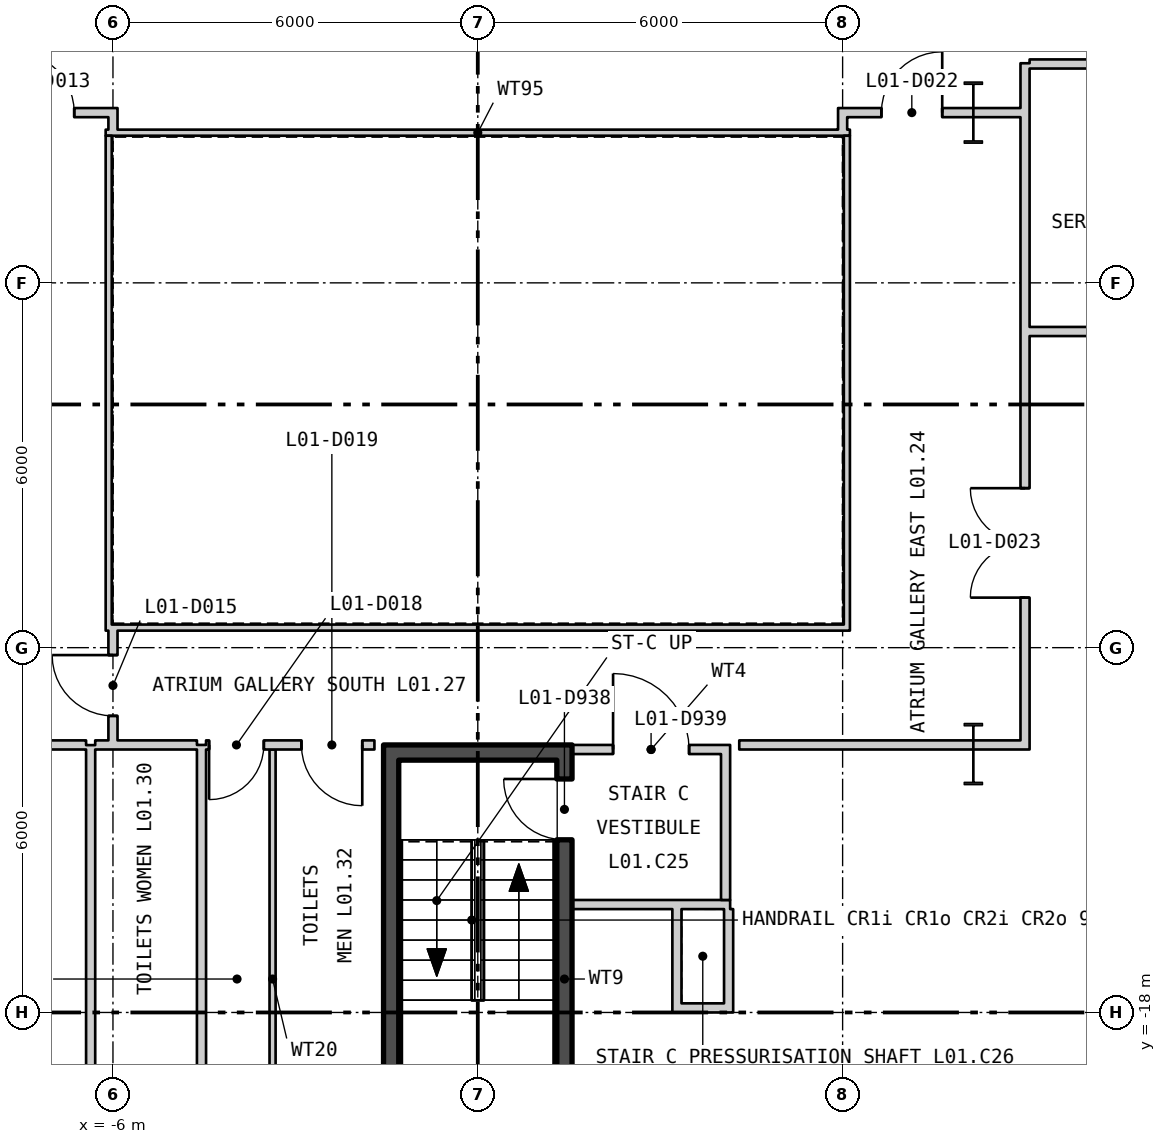
"""IFC4 building model, lengths in metres.
Left out: names, types, materials, properties, quantities, classifications, styles, units other than length and angle.
Written with IfcOpenShell. Run it as: python <this file> out.ifc"""

import sys

from ifc_helpers import new_model, si_unit, direction, frame, frame_2d, origin, origin_2d, place, context, subcontext, project, spatial, rectangle, i_section, extrude, element, fill, save


model = new_model("IFC4")
c1 = context("Model", 3, precision=1e-05, world=origin(), true_north=direction((0.0, 1.0)))
c2 = subcontext(c1, "Body", "Model", "MODEL_VIEW")
j1 = project(units=[si_unit("LENGTHUNIT", "METRE"), si_unit("PLANEANGLEUNIT", "RADIAN")], contexts=[c1])
p1 = place(None, origin())
s1 = spatial("IfcSite", under=j1, at=p1, CompositionType="ELEMENT")
p2 = place(p1, origin())
s2 = spatial("IfcBuilding", under=s1, at=p2, CompositionType="ELEMENT")
p3 = place(p2, frame((0.0, 0.0, 8.4)))
s3 = spatial("IfcBuildingStorey", under=s2, at=p3, CompositionType="ELEMENT", Elevation=8.4)
for number, where, z_axis, x_axis in (
    (1, (8.15, -3.2, 0.0), (0.0, 0.0, 1.0), (1.0, 0.0, 0.0)),
    (2, (8.15, -13.75, 0.0), (0.0, 0.0, 1.0), (1.0, 0.0, 0.0)),
):
    element("IfcColumn", number, at=place(p3, frame(where, z_axis=z_axis, x_axis=x_axis)), inside=s3, PredefinedType="COLUMN", context=c2, shape_type="SweptSolid", body=[
        extrude(i_section(OverallWidth=0.302, OverallDepth=1.008, WebThickness=0.021, FlangeThickness=0.04, at=origin_2d()), origin(), (0.0, 0.0, 1.0), 5.1),
    ])
p4 = place(p3, frame((-6.12, -11.67, 0.0), z_axis=(0.0, 0.0, 1.0), x_axis=(1.0, 0.0, 0.0)))
e3 = element("IfcWall", 3, at=p4, inside=s3, PredefinedType="PARTITIONING", context=c2, shape_type="SweptSolid", body=[
    extrude(rectangle(XDim=12.24, YDim=0.1, at=frame_2d((6.12, 0.0))), origin(), (0.0, 0.0, 1.0), 4.88),
])
p5 = place(p3, frame((6.07, -11.62, 0.0), z_axis=(0.0, 0.0, 1.0), x_axis=(0.0, 1.0, 0.0)))
e4 = element("IfcWall", 4, at=p5, inside=s3, PredefinedType="PARTITIONING", context=c2, shape_type="SweptSolid", body=[
    extrude(rectangle(XDim=8.04, YDim=0.1, at=frame_2d((4.02, 0.0))), origin(), (0.0, 0.0, 1.0), 4.88),
])
p6 = place(p3, frame((6.12, -3.53, 0.0), z_axis=(0.0, 0.0, 1.0), x_axis=(-1.0, 0.0, 0.0)))
e5 = element("IfcWall", 5, at=p6, inside=s3, PredefinedType="PARTITIONING", context=c2, shape_type="SweptSolid", body=[
    extrude(rectangle(XDim=12.24, YDim=0.1, at=frame_2d((6.12, 0.0))), origin(), (0.0, 0.0, 1.0), 4.88),
])
p7 = place(p3, frame((-6.07, -3.58, 0.0), z_axis=(0.0, 0.0, 1.0), x_axis=(0.0, -1.0, 0.0)))
e6 = element("IfcWall", 6, at=p7, inside=s3, PredefinedType="PARTITIONING", context=c2, shape_type="SweptSolid", body=[
    extrude(rectangle(XDim=8.04, YDim=0.1, at=frame_2d((4.02, 0.0))), origin(), (0.0, 0.0, 1.0), 4.88),
])
p8 = place(p3, frame((-1.425, -21.05, 0.0), z_axis=(0.0, 0.0, 1.0), x_axis=(0.0, 1.0, 0.0)))
e7 = element("IfcWall", 7, at=p8, inside=s3, PredefinedType="SHEAR", context=c2, shape_type="SweptSolid", body=[
    extrude(rectangle(XDim=7.2, YDim=0.25, at=frame_2d((3.6, 0.0))), origin(), (0.0, 0.0, 1.0), 4.88),
])
p9 = place(p3, frame((1.425, -21.05, 0.0), z_axis=(0.0, 0.0, 1.0), x_axis=(0.0, 1.0, 0.0)))
e8 = element("IfcWall", 8, at=p9, inside=s3, PredefinedType="SHEAR", context=c2, shape_type="SweptSolid", body=[
    extrude(rectangle(XDim=7.2, YDim=0.25, at=frame_2d((3.6, 0.0))), origin(), (0.0, 0.0, 1.0), 4.88),
])
p10 = place(p9, frame((5.89, 0.0, 0.0)))
e9 = element("IfcOpeningElement", 9, at=p10, cuts=e8, PredefinedType="OPENING", context=c2, shape_type="SweptSolid", body=[
    extrude(rectangle(XDim=1.0, YDim=2.1, at=frame_2d((0.5, 1.05))), frame((0.0, 0.135, 0.0), z_axis=(0.0, -1.0, 0.0), x_axis=(1.0, 0.0, 0.0)), (0.0, 0.0, 1.0), 0.27),
])
p11 = place(p3, frame((-1.55, -13.725, 0.0), z_axis=(0.0, 0.0, 1.0), x_axis=(1.0, 0.0, 0.0)))
e10 = element("IfcWall", 10, at=p11, inside=s3, PredefinedType="SHEAR", context=c2, shape_type="SweptSolid", body=[
    extrude(rectangle(XDim=3.1, YDim=0.25, at=frame_2d((1.55, 0.0))), origin(), (0.0, 0.0, 1.0), 4.88),
])
p12 = place(p3, frame((1.55, -16.225, 0.0), z_axis=(0.0, 0.0, 1.0), x_axis=(1.0, 0.0, 0.0)))
e11 = element("IfcWall", 11, at=p12, inside=s3, PredefinedType="PARTITIONING", context=c2, shape_type="SweptSolid", body=[
    extrude(rectangle(XDim=2.6, YDim=0.15, at=frame_2d((1.3, 0.0))), origin(), (0.0, 0.0, 1.0), 4.88),
])
p13 = place(p3, frame((4.075, -16.15, 0.0), z_axis=(0.0, 0.0, 1.0), x_axis=(0.0, 1.0, 0.0)))
e12 = element("IfcWall", 12, at=p13, inside=s3, PredefinedType="PARTITIONING", context=c2, shape_type="SweptSolid", body=[
    extrude(rectangle(XDim=2.4, YDim=0.15, at=frame_2d((1.2, 0.0))), origin(), (0.0, 0.0, 1.0), 4.88),
])
p14 = place(p3, frame((1.55, -13.675, 0.0), z_axis=(0.0, 0.0, 1.0), x_axis=(1.0, 0.0, 0.0)))
e13 = element("IfcWall", 13, at=p14, inside=s3, PredefinedType="PARTITIONING", context=c2, shape_type="SweptSolid", body=[
    extrude(rectangle(XDim=2.6, YDim=0.15, at=frame_2d((1.3, 0.0))), origin(), (0.0, 0.0, 1.0), 3.97),
])
p15 = place(p14, frame((0.675, 0.0, 0.0)))
e14 = element("IfcOpeningElement", 14, at=p15, cuts=e13, PredefinedType="OPENING", context=c2, shape_type="SweptSolid", body=[
    extrude(rectangle(XDim=1.25, YDim=2.1, at=frame_2d((0.625, 1.05))), frame((0.0, 0.085, 0.0), z_axis=(0.0, -1.0, 0.0), x_axis=(1.0, 0.0, 0.0)), (0.0, 0.0, 1.0), 0.17),
])
p16 = place(p3, frame((3.275, -18.0, 0.0), z_axis=(0.0, 0.0, 1.0), x_axis=(0.0, 1.0, 0.0)))
e15 = element("IfcWall", 15, at=p16, inside=s3, PredefinedType="PARTITIONING", context=c2, shape_type="SweptSolid", body=[
    extrude(rectangle(XDim=1.7, YDim=0.15, at=frame_2d((0.85, 0.0))), origin(), (0.0, 0.0, 1.0), 4.28),
])
p17 = place(p3, frame((3.35, -17.925, 0.0), z_axis=(0.0, 0.0, 1.0), x_axis=(1.0, 0.0, 0.0)))
e16 = element("IfcWall", 16, at=p17, inside=s3, PredefinedType="PARTITIONING", context=c2, shape_type="SweptSolid", body=[
    extrude(rectangle(XDim=0.7, YDim=0.15, at=frame_2d((0.35, 0.0))), origin(), (0.0, 0.0, 1.0), 4.88),
])
p18 = place(p3, frame((4.125, -18.0, 0.0), z_axis=(0.0, 0.0, 1.0), x_axis=(0.0, 1.0, 0.0)))
e17 = element("IfcWall", 17, at=p18, inside=s3, PredefinedType="PARTITIONING", context=c2, shape_type="SweptSolid", body=[
    extrude(rectangle(XDim=1.7, YDim=0.15, at=frame_2d((0.85, 0.0))), origin(), (0.0, 0.0, 1.0), 4.88),
])
p19 = place(p3, frame((-8.15, -13.6, 0.0), z_axis=(0.0, 0.0, 1.0), x_axis=(1.0, 0.0, 0.0)))
e18 = element("IfcWall", 18, at=p19, inside=s3, PredefinedType="PARTITIONING", context=c2, shape_type="SweptSolid", body=[
    extrude(rectangle(XDim=1.708, YDim=0.15, at=frame_2d((0.854, 0.0))), origin(), (0.0, 0.0, 1.0), 3.97),
])
p20 = place(p3, frame((-8.15, -3.2, 0.0), z_axis=(0.0, 0.0, 1.0), x_axis=(1.0, 0.0, 0.0)))
e19 = element("IfcWall", 19, at=p20, inside=s3, PredefinedType="PARTITIONING", context=c2, shape_type="SweptSolid", body=[
    extrude(rectangle(XDim=2.225, YDim=0.15, at=frame_2d((1.113, 0.0))), origin(), (0.0, 0.0, 1.0), 3.97),
])
p21 = place(p20, frame((0.513, 0.0, 0.0)))
e20 = element("IfcOpeningElement", 20, at=p21, cuts=e19, PredefinedType="OPENING", context=c2, shape_type="SweptSolid", body=[
    extrude(rectangle(XDim=1.0, YDim=2.1, at=frame_2d((0.5, 1.05))), frame((0.0, 0.085, 0.0), z_axis=(0.0, -1.0, 0.0), x_axis=(1.0, 0.0, 0.0)), (0.0, 0.0, 1.0), 0.17),
])
p22 = place(p3, frame((-6.367, -21.225, 0.0), z_axis=(0.0, 0.0, 1.0), x_axis=(0.0, 1.0, 0.0)))
e21 = element("IfcWall", 21, at=p22, inside=s3, PredefinedType="PARTITIONING", context=c2, shape_type="SweptSolid", body=[
    extrude(rectangle(XDim=7.622, YDim=0.15, at=frame_2d((3.811, 0.0))), origin(), (0.0, 0.0, 1.0), 4.28),
])
p23 = place(p3, frame((-6.292, -13.6, 0.0), z_axis=(0.0, 0.0, 1.0), x_axis=(1.0, 0.0, 0.0)))
e22 = element("IfcWall", 22, at=p23, inside=s3, PredefinedType="PARTITIONING", context=c2, shape_type="SweptSolid", body=[
    extrude(rectangle(XDim=1.673, YDim=0.15, at=frame_2d((0.837, 0.0))), origin(), (0.0, 0.0, 1.0), 3.97),
])
p24 = place(p3, frame((-6.0, -13.525, 0.0), z_axis=(0.0, 0.0, 1.0), x_axis=(0.0, 1.0, 0.0)))
e23 = element("IfcWall", 23, at=p24, inside=s3, PredefinedType="PARTITIONING", context=c2, shape_type="SweptSolid", body=[
    extrude(rectangle(XDim=1.805, YDim=0.15, at=frame_2d((0.902, 0.0))), origin(), (0.0, 0.0, 1.0), 4.88),
])
p25 = place(p24, frame((0.403, 0.0, 0.0)))
e24 = element("IfcOpeningElement", 24, at=p25, cuts=e23, PredefinedType="OPENING", context=c2, shape_type="SweptSolid", body=[
    extrude(rectangle(XDim=1.0, YDim=2.1, at=frame_2d((0.5, 1.05))), frame((0.0, 0.085, 0.0), z_axis=(0.0, -1.0, 0.0), x_axis=(1.0, 0.0, 0.0)), (0.0, 0.0, 1.0), 0.17),
])
p26 = place(p3, frame((-6.0, -3.48, 0.0), z_axis=(0.0, 0.0, 1.0), x_axis=(0.0, 1.0, 0.0)))
e25 = element("IfcWall", 25, at=p26, inside=s3, PredefinedType="PARTITIONING", context=c2, shape_type="SweptSolid", body=[
    extrude(rectangle(XDim=0.205, YDim=0.15, at=frame_2d((0.102, 0.0))), origin(), (0.0, 0.0, 1.0), 4.88),
])
p27 = place(p3, frame((-4.544, -21.3, 0.0), z_axis=(0.0, 0.0, 1.0), x_axis=(0.0, 1.0, 0.0)))
e26 = element("IfcWall", 26, at=p27, inside=s3, PredefinedType="PARTITIONING", context=c2, shape_type="SweptSolid", body=[
    extrude(rectangle(XDim=7.7, YDim=0.15, at=frame_2d((3.85, 0.0))), origin(), (0.0, 0.0, 1.0), 4.88),
])
p28 = place(p3, frame((-4.469, -13.6, 0.0), z_axis=(0.0, 0.0, 1.0), x_axis=(1.0, 0.0, 0.0)))
e27 = element("IfcWall", 27, at=p28, inside=s3, PredefinedType="PARTITIONING", context=c2, shape_type="SweptSolid", body=[
    extrude(rectangle(XDim=2.769, YDim=0.15, at=frame_2d((1.385, 0.0))), origin(), (0.0, 0.0, 1.0), 3.97),
])
p29 = place(p28, frame((0.05, 0.0, 0.0)))
e28 = element("IfcOpeningElement", 28, at=p29, cuts=e27, PredefinedType="OPENING", context=c2, shape_type="SweptSolid", body=[
    extrude(rectangle(XDim=0.9, YDim=2.1, at=frame_2d((0.45, 1.05))), frame((0.0, 0.085, 0.0), z_axis=(0.0, -1.0, 0.0), x_axis=(1.0, 0.0, 0.0)), (0.0, 0.0, 1.0), 0.17),
])
p30 = place(p28, frame((1.569, 0.0, 0.0)))
e29 = element("IfcOpeningElement", 29, at=p30, cuts=e27, PredefinedType="OPENING", context=c2, shape_type="SweptSolid", body=[
    extrude(rectangle(XDim=1.0, YDim=2.1, at=frame_2d((0.5, 1.05))), frame((0.0, 0.085, 0.0), z_axis=(0.0, -1.0, 0.0), x_axis=(1.0, 0.0, 0.0)), (0.0, 0.0, 1.0), 0.17),
])
p31 = place(p3, frame((-3.375, -21.225, 0.0), z_axis=(0.0, 0.0, 1.0), x_axis=(0.0, 1.0, 0.0)))
e30 = element("IfcWall", 30, at=p31, inside=s3, PredefinedType="PARTITIONING", context=c2, shape_type="SweptSolid", body=[
    extrude(rectangle(XDim=7.55, YDim=0.1, at=frame_2d((3.775, 0.0))), origin(), (0.0, 0.0, 1.0), 4.88),
])
p32 = place(p3, frame((4.3, -13.6, 0.0), z_axis=(0.0, 0.0, 1.0), x_axis=(1.0, 0.0, 0.0)))
e31 = element("IfcWall", 31, at=p32, inside=s3, PredefinedType="PARTITIONING", context=c2, shape_type="SweptSolid", body=[
    extrude(rectangle(XDim=3.85, YDim=0.15, at=frame_2d((1.925, 0.0))), origin(), (0.0, 0.0, 1.0), 3.97),
])
p33 = place(p3, frame((8.15, -13.6, 0.0), z_axis=(0.0, 0.0, 1.0), x_axis=(1.0, 0.0, 0.0)))
e32 = element("IfcWall", 32, at=p33, inside=s3, PredefinedType="PARTITIONING", context=c2, shape_type="SweptSolid", body=[
    extrude(rectangle(XDim=0.775, YDim=0.15, at=frame_2d((0.388, 0.0))), origin(), (0.0, 0.0, 1.0), 4.09),
])
p34 = place(p3, frame((5.925, -3.2, 0.0), z_axis=(0.0, 0.0, 1.0), x_axis=(1.0, 0.0, 0.0)))
e33 = element("IfcWall", 33, at=p34, inside=s3, PredefinedType="PARTITIONING", context=c2, shape_type="SweptSolid", body=[
    extrude(rectangle(XDim=2.225, YDim=0.15, at=frame_2d((1.113, 0.0))), origin(), (0.0, 0.0, 1.0), 3.97),
])
p35 = place(p34, frame((0.713, 0.0, 0.0)))
e34 = element("IfcOpeningElement", 34, at=p35, cuts=e33, PredefinedType="OPENING", context=c2, shape_type="SweptSolid", body=[
    extrude(rectangle(XDim=1.0, YDim=2.1, at=frame_2d((0.5, 1.05))), frame((0.0, 0.085, 0.0), z_axis=(0.0, -1.0, 0.0), x_axis=(1.0, 0.0, 0.0)), (0.0, 0.0, 1.0), 0.17),
])
p36 = place(p3, frame((8.15, -3.2, 0.0), z_axis=(0.0, 0.0, 1.0), x_axis=(1.0, 0.0, 0.0)))
e35 = element("IfcWall", 35, at=p36, inside=s3, PredefinedType="PARTITIONING", context=c2, shape_type="SweptSolid", body=[
    extrude(rectangle(XDim=0.775, YDim=0.15, at=frame_2d((0.388, 0.0))), origin(), (0.0, 0.0, 1.0), 4.09),
])
p37 = place(p3, frame((6.0, -3.48, 0.0), z_axis=(0.0, 0.0, 1.0), x_axis=(0.0, 1.0, 0.0)))
e36 = element("IfcWall", 36, at=p37, inside=s3, PredefinedType="PARTITIONING", context=c2, shape_type="SweptSolid", body=[
    extrude(rectangle(XDim=0.205, YDim=0.15, at=frame_2d((0.102, 0.0))), origin(), (0.0, 0.0, 1.0), 4.88),
])
p38 = place(p3, frame((9.0, -13.675, 0.0), z_axis=(0.0, 0.0, 1.0), x_axis=(0.0, 1.0, 0.0)))
e37 = element("IfcWall", 37, at=p38, inside=s3, PredefinedType="PARTITIONING", context=c2, shape_type="SweptSolid", body=[
    extrude(rectangle(XDim=11.287, YDim=0.15, at=frame_2d((5.644, 0.0))), origin(), (0.0, 0.0, 1.0), 4.88),
])
p39 = place(p38, frame((2.498, 0.0, 0.0)))
e38 = element("IfcOpeningElement", 38, at=p39, cuts=e37, PredefinedType="OPENING", context=c2, shape_type="SweptSolid", body=[
    extrude(rectangle(XDim=1.8, YDim=2.1, at=frame_2d((0.9, 1.05))), frame((0.0, 0.085, 0.0), z_axis=(0.0, -1.0, 0.0), x_axis=(1.0, 0.0, 0.0)), (0.0, 0.0, 1.0), 0.17),
])
p40 = place(p3, frame((9.075, -6.8, 0.0), z_axis=(0.0, 0.0, 1.0), x_axis=(1.0, 0.0, 0.0)))
e39 = element("IfcWall", 39, at=p40, inside=s3, PredefinedType="PARTITIONING", context=c2, shape_type="SweptSolid", body=[
    extrude(rectangle(XDim=7.95, YDim=0.15, at=frame_2d((3.975, 0.0))), origin(), (0.0, 0.0, 1.0), 4.88),
])
p41 = place(p3, frame((9.075, -2.4, 0.0), z_axis=(0.0, 0.0, 1.0), x_axis=(1.0, 0.0, 0.0)))
e40 = element("IfcWall", 40, at=p41, inside=s3, PredefinedType="PARTITIONING", context=c2, shape_type="SweptSolid", body=[
    extrude(rectangle(XDim=7.95, YDim=0.15, at=frame_2d((3.975, 0.0))), origin(), (0.0, 0.0, 1.0), 4.88),
])
p42 = place(p41, frame((1.329, 0.0, 0.0)))
e41 = element("IfcOpeningElement", 41, at=p42, cuts=e40, PredefinedType="OPENING", context=c2, shape_type="SweptSolid", body=[
    extrude(rectangle(XDim=1.0, YDim=2.1, at=frame_2d((0.5, 1.05))), frame((0.0, 0.085, 0.0), z_axis=(0.0, -1.0, 0.0), x_axis=(1.0, 0.0, 0.0)), (0.0, 0.0, 1.0), 0.17),
])
p43 = place(p41, frame((5.279, 0.0, 0.0)))
e42 = element("IfcOpeningElement", 42, at=p43, cuts=e40, PredefinedType="OPENING", context=c2, shape_type="SweptSolid", body=[
    extrude(rectangle(XDim=1.0, YDim=2.1, at=frame_2d((0.5, 1.05))), frame((0.0, 0.085, 0.0), z_axis=(0.0, -1.0, 0.0), x_axis=(1.0, 0.0, 0.0)), (0.0, 0.0, 1.0), 0.17),
])
p44 = place(p10, origin())
e43 = element("IfcDoor", 43, at=p44, inside=s3, OperationType="SINGLE_SWING_LEFT", PredefinedType="DOOR", context=c2, shape_type="SweptSolid", body=[
    extrude(rectangle(XDim=1.0, YDim=2.1, at=frame_2d((0.5, 1.05))), frame((0.0, 0.025, 0.0), z_axis=(0.0, -1.0, 0.0), x_axis=(1.0, 0.0, 0.0)), (0.0, 0.0, 1.0), 0.05),
])
fill(e9, e43)
p45 = place(p15, origin())
e44 = element("IfcDoor", 44, at=p45, inside=s3, OperationType="SINGLE_SWING_RIGHT", PredefinedType="DOOR", context=c2, shape_type="SweptSolid", body=[
    extrude(rectangle(XDim=1.25, YDim=2.1, at=frame_2d((0.625, 1.05))), frame((0.0, 0.025, 0.0), z_axis=(0.0, -1.0, 0.0), x_axis=(1.0, 0.0, 0.0)), (0.0, 0.0, 1.0), 0.05),
])
fill(e14, e44)
p46 = place(p21, origin())
e45 = element("IfcDoor", 45, at=p46, inside=s3, OperationType="SINGLE_SWING_RIGHT", PredefinedType="DOOR", context=c2, shape_type="SweptSolid", body=[
    extrude(rectangle(XDim=1.0, YDim=2.1, at=frame_2d((0.5, 1.05))), frame((0.0, 0.025, 0.0), z_axis=(0.0, -1.0, 0.0), x_axis=(1.0, 0.0, 0.0)), (0.0, 0.0, 1.0), 0.05),
])
fill(e20, e45)
p47 = place(p25, origin())
e46 = element("IfcDoor", 46, at=p47, inside=s3, OperationType="SINGLE_SWING_LEFT", PredefinedType="DOOR", context=c2, shape_type="SweptSolid", body=[
    extrude(rectangle(XDim=1.0, YDim=2.1, at=frame_2d((0.5, 1.05))), frame((0.0, 0.025, 0.0), z_axis=(0.0, -1.0, 0.0), x_axis=(1.0, 0.0, 0.0)), (0.0, 0.0, 1.0), 0.05),
])
fill(e24, e46)
p48 = place(p29, origin())
e47 = element("IfcDoor", 47, at=p48, inside=s3, OperationType="SINGLE_SWING_LEFT", PredefinedType="DOOR", context=c2, shape_type="SweptSolid", body=[
    extrude(rectangle(XDim=0.9, YDim=2.1, at=frame_2d((0.45, 1.05))), frame((0.0, 0.025, 0.0), z_axis=(0.0, -1.0, 0.0), x_axis=(1.0, 0.0, 0.0)), (0.0, 0.0, 1.0), 0.05),
])
fill(e28, e47)
p49 = place(p30, origin())
e48 = element("IfcDoor", 48, at=p49, inside=s3, OperationType="SINGLE_SWING_RIGHT", PredefinedType="DOOR", context=c2, shape_type="SweptSolid", body=[
    extrude(rectangle(XDim=1.0, YDim=2.1, at=frame_2d((0.5, 1.05))), frame((0.0, 0.025, 0.0), z_axis=(0.0, -1.0, 0.0), x_axis=(1.0, 0.0, 0.0)), (0.0, 0.0, 1.0), 0.05),
])
fill(e29, e48)
p50 = place(p35, origin())
e49 = element("IfcDoor", 49, at=p50, inside=s3, OperationType="SINGLE_SWING_LEFT", PredefinedType="DOOR", context=c2, shape_type="SweptSolid", body=[
    extrude(rectangle(XDim=1.0, YDim=2.1, at=frame_2d((0.5, 1.05))), frame((0.0, 0.025, 0.0), z_axis=(0.0, -1.0, 0.0), x_axis=(1.0, 0.0, 0.0)), (0.0, 0.0, 1.0), 0.05),
])
fill(e34, e49)
p51 = place(p39, origin())
e50 = element("IfcDoor", 50, at=p51, inside=s3, OperationType="DOUBLE_DOOR_SINGLE_SWING", PredefinedType="DOOR", context=c2, shape_type="SweptSolid", body=[
    extrude(rectangle(XDim=1.8, YDim=2.1, at=frame_2d((0.9, 1.05))), frame((0.0, 0.025, 0.0), z_axis=(0.0, -1.0, 0.0), x_axis=(1.0, 0.0, 0.0)), (0.0, 0.0, 1.0), 0.05),
])
fill(e38, e50)
save(model, sys.argv[1])
